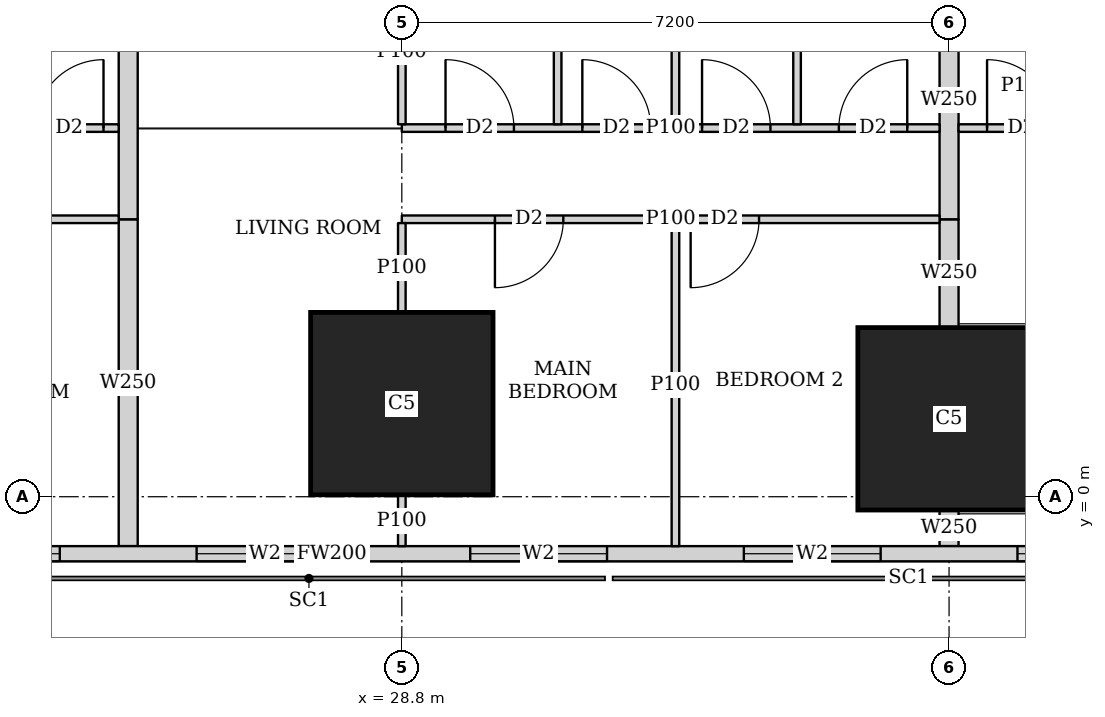
"""IFC4 building model, lengths in metres.
Left out: names, types, materials, properties, quantities, classifications, styles, units other than length and angle.
Written with IfcOpenShell. Run it as: python <this file> out.ifc"""

import sys

from ifc_helpers import new_model, si_unit, direction, frame, frame_2d, origin, origin_2d, place, context, subcontext, project, spatial, rectangle, extrude, element, fill, save


model = new_model("IFC4")
c1 = context("Model", 3, precision=1e-05, world=origin(), true_north=direction((0.0, 1.0)))
c2 = subcontext(c1, "Body", "Model", "MODEL_VIEW")
j1 = project(units=[si_unit("LENGTHUNIT", "METRE"), si_unit("PLANEANGLEUNIT", "RADIAN")], contexts=[c1])
p1 = place(None, origin())
s1 = spatial("IfcSite", under=j1, at=p1, CompositionType="ELEMENT")
p2 = place(p1, origin())
s2 = spatial("IfcBuilding", under=s1, at=p2, CompositionType="ELEMENT")
p3 = place(p2, frame((0.0, 0.0, 204.95)))
s3 = spatial("IfcBuildingStorey", under=s2, at=p3, CompositionType="ELEMENT", Elevation=204.95)
for number, where, z_axis, x_axis in (
    (1, (28.8, 1.225, 0.0), (0.0, 0.0, 1.0), (1.0, 0.0, 0.0)),
    (2, (36.0, 1.025, 0.0), (0.0, 0.0, 1.0), (1.0, 0.0, 0.0)),
):
    element("IfcColumn", number, at=place(p3, frame(where, z_axis=z_axis, x_axis=x_axis)), inside=s3, PredefinedType="COLUMN", context=c2, shape_type="SweptSolid", body=[
        extrude(rectangle(XDim=2.4, YDim=2.4, at=origin_2d()), origin(), (0.0, 0.0, 1.0), 3.75),
    ])
p4 = place(p3, frame((7.363, -0.75, 0.0), z_axis=(0.0, 0.0, 1.0), x_axis=(1.0, 0.0, 0.0)))
e3 = element("IfcWall", 3, at=p4, inside=s3, PredefinedType="SOLIDWALL", context=c2, shape_type="SweptSolid", body=[
    extrude(rectangle(XDim=40.428, YDim=0.2, at=frame_2d((20.214, 0.0))), origin(), (0.0, 0.0, 1.0), 3.5),
])
p5 = place(p4, frame((2.319, 0.0, 0.9)))
e4 = element("IfcOpeningElement", 4, at=p5, cuts=e3, PredefinedType="OPENING", context=c2, shape_type="SweptSolid", body=[
    extrude(rectangle(XDim=2.4, YDim=1.5, at=frame_2d((1.2, 0.75))), frame((0.0, 0.11, 0.0), z_axis=(0.0, -1.0, 0.0), x_axis=(1.0, 0.0, 0.0)), (0.0, 0.0, 1.0), 0.22),
])
p6 = place(p4, frame((7.937, 0.0, 0.9)))
e5 = element("IfcOpeningElement", 5, at=p6, cuts=e3, PredefinedType="OPENING", context=c2, shape_type="SweptSolid", body=[
    extrude(rectangle(XDim=1.8, YDim=1.5, at=frame_2d((0.9, 0.75))), frame((0.0, 0.11, 0.0), z_axis=(0.0, -1.0, 0.0), x_axis=(1.0, 0.0, 0.0)), (0.0, 0.0, 1.0), 0.22),
])
p7 = place(p4, frame((11.537, 0.0, 0.9)))
e6 = element("IfcOpeningElement", 6, at=p7, cuts=e3, PredefinedType="OPENING", context=c2, shape_type="SweptSolid", body=[
    extrude(rectangle(XDim=1.8, YDim=1.5, at=frame_2d((0.9, 0.75))), frame((0.0, 0.11, 0.0), z_axis=(0.0, -1.0, 0.0), x_axis=(1.0, 0.0, 0.0)), (0.0, 0.0, 1.0), 0.22),
])
p8 = place(p4, frame((15.137, 0.0, 0.9)))
e7 = element("IfcOpeningElement", 7, at=p8, cuts=e3, PredefinedType="OPENING", context=c2, shape_type="SweptSolid", body=[
    extrude(rectangle(XDim=1.8, YDim=1.5, at=frame_2d((0.9, 0.75))), frame((0.0, 0.11, 0.0), z_axis=(0.0, -1.0, 0.0), x_axis=(1.0, 0.0, 0.0)), (0.0, 0.0, 1.0), 0.22),
])
p9 = place(p4, frame((18.737, 0.0, 0.9)))
e8 = element("IfcOpeningElement", 8, at=p9, cuts=e3, PredefinedType="OPENING", context=c2, shape_type="SweptSolid", body=[
    extrude(rectangle(XDim=1.8, YDim=1.5, at=frame_2d((0.9, 0.75))), frame((0.0, 0.11, 0.0), z_axis=(0.0, -1.0, 0.0), x_axis=(1.0, 0.0, 0.0)), (0.0, 0.0, 1.0), 0.22),
])
p10 = place(p4, frame((22.337, 0.0, 0.9)))
e9 = element("IfcOpeningElement", 9, at=p10, cuts=e3, PredefinedType="OPENING", context=c2, shape_type="SweptSolid", body=[
    extrude(rectangle(XDim=1.8, YDim=1.5, at=frame_2d((0.9, 0.75))), frame((0.0, 0.11, 0.0), z_axis=(0.0, -1.0, 0.0), x_axis=(1.0, 0.0, 0.0)), (0.0, 0.0, 1.0), 0.22),
])
p11 = place(p4, frame((25.937, 0.0, 0.9)))
e10 = element("IfcOpeningElement", 10, at=p11, cuts=e3, PredefinedType="OPENING", context=c2, shape_type="SweptSolid", body=[
    extrude(rectangle(XDim=1.8, YDim=1.5, at=frame_2d((0.9, 0.75))), frame((0.0, 0.11, 0.0), z_axis=(0.0, -1.0, 0.0), x_axis=(1.0, 0.0, 0.0)), (0.0, 0.0, 1.0), 0.22),
])
p12 = place(p4, frame((29.537, 0.0, 0.9)))
e11 = element("IfcOpeningElement", 11, at=p12, cuts=e3, PredefinedType="OPENING", context=c2, shape_type="SweptSolid", body=[
    extrude(rectangle(XDim=1.8, YDim=1.5, at=frame_2d((0.9, 0.75))), frame((0.0, 0.11, 0.0), z_axis=(0.0, -1.0, 0.0), x_axis=(1.0, 0.0, 0.0)), (0.0, 0.0, 1.0), 0.22),
])
p13 = place(p3, frame((33.68, 42.723, 0.0), z_axis=(0.0, 0.0, 1.0), x_axis=(0.185601160014, -0.982625162207, 0.0)))
e12 = element("IfcWall", 12, at=p13, inside=s3, PredefinedType="SOLIDWALL", context=c2, shape_type="SweptSolid", body=[
    extrude(rectangle(XDim=41.051, YDim=0.15, at=frame_2d((20.526, 0.0))), origin(), (0.0, 0.0, 1.0), 2.5),
])
p14 = place(p13, frame((12.307, 0.0, 0.0)))
e13 = element("IfcOpeningElement", 13, at=p14, cuts=e12, PredefinedType="OPENING", context=c2, shape_type="SweptSolid", body=[
    extrude(rectangle(XDim=1.0, YDim=2.1, at=frame_2d((0.5, 1.05))), frame((0.0, 0.085, 0.0), z_axis=(0.0, -1.0, 0.0), x_axis=(1.0, 0.0, 0.0)), (0.0, 0.0, 1.0), 0.17),
])
p15 = place(p13, frame((16.123, 0.0, 0.0)))
e14 = element("IfcOpeningElement", 14, at=p15, cuts=e12, PredefinedType="OPENING", context=c2, shape_type="SweptSolid", body=[
    extrude(rectangle(XDim=1.0, YDim=2.1, at=frame_2d((0.5, 1.05))), frame((0.0, 0.085, 0.0), z_axis=(0.0, -1.0, 0.0), x_axis=(1.0, 0.0, 0.0)), (0.0, 0.0, 1.0), 0.17),
])
p16 = place(p13, frame((30.902, 0.0, 0.0)))
e15 = element("IfcOpeningElement", 15, at=p16, cuts=e12, PredefinedType="OPENING", context=c2, shape_type="SweptSolid", body=[
    extrude(rectangle(XDim=1.0, YDim=2.1, at=frame_2d((0.5, 1.05))), frame((0.0, 0.085, 0.0), z_axis=(0.0, -1.0, 0.0), x_axis=(1.0, 0.0, 0.0)), (0.0, 0.0, 1.0), 0.17),
])
p17 = place(p3, frame((25.075, 3.65, 0.0), z_axis=(0.0, 0.0, 1.0), x_axis=(-1.0, 0.0, 0.0)))
e16 = element("IfcWall", 16, at=p17, inside=s3, PredefinedType="PARTITIONING", context=c2, shape_type="SweptSolid", body=[
    extrude(rectangle(XDim=3.475, YDim=0.1, at=frame_2d((1.737, 0.0))), origin(), (0.0, 0.0, 1.0), 3.5),
])
p18 = place(p17, frame((2.375, 0.0, 0.0)))
e17 = element("IfcOpeningElement", 17, at=p18, cuts=e16, PredefinedType="OPENING", context=c2, shape_type="SweptSolid", body=[
    extrude(rectangle(XDim=0.9, YDim=2.1, at=frame_2d((0.45, 1.05))), frame((0.0, 0.06, 0.0), z_axis=(0.0, -1.0, 0.0), x_axis=(1.0, 0.0, 0.0)), (0.0, 0.0, 1.0), 0.12),
])
p19 = place(p3, frame((25.075, 4.85, 0.0), z_axis=(0.0, 0.0, 1.0), x_axis=(-1.0, 0.0, 0.0)))
e18 = element("IfcWall", 18, at=p19, inside=s3, PredefinedType="PARTITIONING", context=c2, shape_type="SweptSolid", body=[
    extrude(rectangle(XDim=3.475, YDim=0.1, at=frame_2d((1.737, 0.0))), origin(), (0.0, 0.0, 1.0), 3.5),
])
p20 = place(p19, frame((2.0, 0.0, 0.0)))
e19 = element("IfcOpeningElement", 19, at=p20, cuts=e18, PredefinedType="OPENING", context=c2, shape_type="SweptSolid", body=[
    extrude(rectangle(XDim=0.9, YDim=2.1, at=frame_2d((0.45, 1.05))), frame((0.0, 0.06, 0.0), z_axis=(0.0, -1.0, 0.0), x_axis=(1.0, 0.0, 0.0)), (0.0, 0.0, 1.0), 0.12),
])
p21 = place(p19, frame((0.2, 0.0, 0.0)))
e20 = element("IfcOpeningElement", 20, at=p21, cuts=e18, PredefinedType="OPENING", context=c2, shape_type="SweptSolid", body=[
    extrude(rectangle(XDim=0.9, YDim=2.1, at=frame_2d((0.45, 1.05))), frame((0.0, 0.06, 0.0), z_axis=(0.0, -1.0, 0.0), x_axis=(1.0, 0.0, 0.0)), (0.0, 0.0, 1.0), 0.12),
])
p22 = place(p3, frame((35.875, 3.65, 0.0), z_axis=(0.0, 0.0, 1.0), x_axis=(-1.0, 0.0, 0.0)))
e21 = element("IfcWall", 21, at=p22, inside=s3, PredefinedType="PARTITIONING", context=c2, shape_type="SweptSolid", body=[
    extrude(rectangle(XDim=7.075, YDim=0.1, at=frame_2d((3.538, 0.0))), origin(), (0.0, 0.0, 1.0), 3.5),
])
p23 = place(p22, frame((4.95, 0.0, 0.0)))
e22 = element("IfcOpeningElement", 22, at=p23, cuts=e21, PredefinedType="OPENING", context=c2, shape_type="SweptSolid", body=[
    extrude(rectangle(XDim=0.9, YDim=2.1, at=frame_2d((0.45, 1.05))), frame((0.0, 0.06, 0.0), z_axis=(0.0, -1.0, 0.0), x_axis=(1.0, 0.0, 0.0)), (0.0, 0.0, 1.0), 0.12),
])
p24 = place(p22, frame((2.375, 0.0, 0.0)))
e23 = element("IfcOpeningElement", 23, at=p24, cuts=e21, PredefinedType="OPENING", context=c2, shape_type="SweptSolid", body=[
    extrude(rectangle(XDim=0.9, YDim=2.1, at=frame_2d((0.45, 1.05))), frame((0.0, 0.06, 0.0), z_axis=(0.0, -1.0, 0.0), x_axis=(1.0, 0.0, 0.0)), (0.0, 0.0, 1.0), 0.12),
])
p25 = place(p3, frame((35.875, 4.85, 0.0), z_axis=(0.0, 0.0, 1.0), x_axis=(-1.0, 0.0, 0.0)))
e24 = element("IfcWall", 24, at=p25, inside=s3, PredefinedType="PARTITIONING", context=c2, shape_type="SweptSolid", body=[
    extrude(rectangle(XDim=7.075, YDim=0.1, at=frame_2d((3.538, 0.0))), origin(), (0.0, 0.0, 1.0), 3.5),
])
p26 = place(p25, frame((5.6, 0.0, 0.0)))
e25 = element("IfcOpeningElement", 25, at=p26, cuts=e24, PredefinedType="OPENING", context=c2, shape_type="SweptSolid", body=[
    extrude(rectangle(XDim=0.9, YDim=2.1, at=frame_2d((0.45, 1.05))), frame((0.0, 0.06, 0.0), z_axis=(0.0, -1.0, 0.0), x_axis=(1.0, 0.0, 0.0)), (0.0, 0.0, 1.0), 0.12),
])
p27 = place(p25, frame((2.225, 0.0, 0.0)))
e26 = element("IfcOpeningElement", 26, at=p27, cuts=e24, PredefinedType="OPENING", context=c2, shape_type="SweptSolid", body=[
    extrude(rectangle(XDim=0.9, YDim=2.1, at=frame_2d((0.45, 1.05))), frame((0.0, 0.06, 0.0), z_axis=(0.0, -1.0, 0.0), x_axis=(1.0, 0.0, 0.0)), (0.0, 0.0, 1.0), 0.12),
])
p28 = place(p25, frame((3.8, 0.0, 0.0)))
e27 = element("IfcOpeningElement", 27, at=p28, cuts=e24, PredefinedType="OPENING", context=c2, shape_type="SweptSolid", body=[
    extrude(rectangle(XDim=0.9, YDim=2.1, at=frame_2d((0.45, 1.05))), frame((0.0, 0.06, 0.0), z_axis=(0.0, -1.0, 0.0), x_axis=(1.0, 0.0, 0.0)), (0.0, 0.0, 1.0), 0.12),
])
p29 = place(p25, frame((0.425, 0.0, 0.0)))
e28 = element("IfcOpeningElement", 28, at=p29, cuts=e24, PredefinedType="OPENING", context=c2, shape_type="SweptSolid", body=[
    extrude(rectangle(XDim=0.9, YDim=2.1, at=frame_2d((0.45, 1.05))), frame((0.0, 0.06, 0.0), z_axis=(0.0, -1.0, 0.0), x_axis=(1.0, 0.0, 0.0)), (0.0, 0.0, 1.0), 0.12),
])
p30 = place(p3, frame((28.8, -0.65, 0.0), z_axis=(0.0, 0.0, 1.0), x_axis=(0.0, 1.0, 0.0)))
e29 = element("IfcWall", 29, at=p30, inside=s3, PredefinedType="PARTITIONING", context=c2, shape_type="SweptSolid", body=[
    extrude(rectangle(XDim=0.674, YDim=0.1, at=frame_2d((0.337, 0.0))), origin(), (0.0, 0.0, 1.0), 3.5),
])
p31 = place(p3, frame((28.8, 2.426, 0.0), z_axis=(0.0, 0.0, 1.0), x_axis=(0.0, 1.0, 0.0)))
e30 = element("IfcWall", 30, at=p31, inside=s3, PredefinedType="PARTITIONING", context=c2, shape_type="SweptSolid", body=[
    extrude(rectangle(XDim=1.174, YDim=0.1, at=frame_2d((0.587, 0.0))), origin(), (0.0, 0.0, 1.0), 3.5),
])
p32 = place(p3, frame((32.4, -0.65, 0.0), z_axis=(0.0, 0.0, 1.0), x_axis=(0.0, 1.0, 0.0)))
e31 = element("IfcWall", 31, at=p32, inside=s3, PredefinedType="PARTITIONING", context=c2, shape_type="SweptSolid", body=[
    extrude(rectangle(XDim=4.25, YDim=0.1, at=frame_2d((2.125, 0.0))), origin(), (0.0, 0.0, 1.0), 2.05),
])
p33 = place(p3, frame((28.8, 4.9, 0.0), z_axis=(0.0, 0.0, 1.0), x_axis=(0.0, 1.0, 0.0)))
e32 = element("IfcWall", 32, at=p33, inside=s3, PredefinedType="PARTITIONING", context=c2, shape_type="SweptSolid", body=[
    extrude(rectangle(XDim=1.899, YDim=0.1, at=frame_2d((0.95, 0.0))), origin(), (0.0, 0.0, 1.0), 3.5),
])
for number, where, z_axis, x_axis in (
    (33, (32.4, 4.9, 0.0), (0.0, 0.0, 1.0), (0.0, 1.0, 0.0)),
    (34, (30.85, 4.9, 0.0), (0.0, 0.0, 1.0), (0.0, 1.0, 0.0)),
    (35, (34.0, 4.9, 0.0), (0.0, 0.0, 1.0), (0.0, 1.0, 0.0)),
):
    element("IfcWall", number, at=place(p3, frame(where, z_axis=z_axis, x_axis=x_axis)), inside=s3, PredefinedType="PARTITIONING", context=c2, shape_type="SweptSolid", body=[
        extrude(rectangle(XDim=3.525, YDim=0.1, at=frame_2d((1.763, 0.0))), origin(), (0.0, 0.0, 1.0), 3.5),
    ])
p34 = place(p3, frame((25.2, -0.65, 0.0), z_axis=(0.0, 0.0, 1.0), x_axis=(0.0, 1.0, 0.0)))
e36 = element("IfcWall", 36, at=p34, inside=s3, PredefinedType="SOLIDWALL", context=c2, shape_type="SweptSolid", body=[
    extrude(rectangle(XDim=4.3, YDim=0.25, at=frame_2d((2.15, 0.0))), origin(), (0.0, 0.0, 1.0), 2.05),
])
p35 = place(p3, frame((25.2, 3.65, 0.0), z_axis=(0.0, 0.0, 1.0), x_axis=(0.0, 1.0, 0.0)))
e37 = element("IfcWall", 37, at=p35, inside=s3, PredefinedType="SOLIDWALL", context=c2, shape_type="SweptSolid", body=[
    extrude(rectangle(XDim=4.775, YDim=0.25, at=frame_2d((2.388, 0.0))), origin(), (0.0, 0.0, 1.0), 3.5),
])
p36 = place(p3, frame((37.89, 4.85, 0.0), z_axis=(0.0, 0.0, 1.0), x_axis=(-1.0, 0.0, 0.0)))
e38 = element("IfcWall", 38, at=p36, inside=s3, PredefinedType="PARTITIONING", context=c2, shape_type="SweptSolid", body=[
    extrude(rectangle(XDim=1.765, YDim=0.1, at=frame_2d((0.882, 0.0))), origin(), (0.0, 0.0, 1.0), 3.5),
])
p37 = place(p36, frame((0.49, 0.0, 0.0)))
e39 = element("IfcOpeningElement", 39, at=p37, cuts=e38, PredefinedType="OPENING", context=c2, shape_type="SweptSolid", body=[
    extrude(rectangle(XDim=0.9, YDim=2.1, at=frame_2d((0.45, 1.05))), frame((0.0, 0.06, 0.0), z_axis=(0.0, -1.0, 0.0), x_axis=(1.0, 0.0, 0.0)), (0.0, 0.0, 1.0), 0.12),
])
p38 = place(p3, frame((36.0, -0.65, 0.0), z_axis=(0.0, 0.0, 1.0), x_axis=(0.0, 1.0, 0.0)))
e40 = element("IfcWall", 40, at=p38, inside=s3, PredefinedType="SOLIDWALL", context=c2, shape_type="SweptSolid", body=[
    extrude(rectangle(XDim=0.474, YDim=0.25, at=frame_2d((0.237, 0.0))), origin(), (0.0, 0.0, 1.0), 2.05),
])
p39 = place(p3, frame((36.0, 2.226, 0.0), z_axis=(0.0, 0.0, 1.0), x_axis=(0.0, 1.0, 0.0)))
e41 = element("IfcWall", 41, at=p39, inside=s3, PredefinedType="SOLIDWALL", context=c2, shape_type="SweptSolid", body=[
    extrude(rectangle(XDim=1.424, YDim=0.25, at=frame_2d((0.712, 0.0))), origin(), (0.0, 0.0, 1.0), 2.05),
])
p40 = place(p3, frame((36.0, 3.65, 0.0), z_axis=(0.0, 0.0, 1.0), x_axis=(0.0, 1.0, 0.0)))
e42 = element("IfcWall", 42, at=p40, inside=s3, PredefinedType="SOLIDWALL", context=c2, shape_type="SweptSolid", body=[
    extrude(rectangle(XDim=3.149, YDim=0.25, at=frame_2d((1.575, 0.0))), origin(), (0.0, 0.0, 1.0), 3.5),
])
p41 = place(p8, origin())
e43 = element("IfcWindow", 43, at=p41, inside=s3, PartitioningType="SINGLE_PANEL", PredefinedType="WINDOW", context=c2, shape_type="SweptSolid", body=[
    extrude(rectangle(XDim=1.8, YDim=1.5, at=frame_2d((0.9, 0.75))), frame((0.0, 0.03, 0.0), z_axis=(0.0, -1.0, 0.0), x_axis=(1.0, 0.0, 0.0)), (0.0, 0.0, 1.0), 0.06),
])
fill(e7, e43)
p42 = place(p9, origin())
e44 = element("IfcWindow", 44, at=p42, inside=s3, PartitioningType="SINGLE_PANEL", PredefinedType="WINDOW", context=c2, shape_type="SweptSolid", body=[
    extrude(rectangle(XDim=1.8, YDim=1.5, at=frame_2d((0.9, 0.75))), frame((0.0, 0.03, 0.0), z_axis=(0.0, -1.0, 0.0), x_axis=(1.0, 0.0, 0.0)), (0.0, 0.0, 1.0), 0.06),
])
fill(e8, e44)
p43 = place(p10, origin())
e45 = element("IfcWindow", 45, at=p43, inside=s3, PartitioningType="SINGLE_PANEL", PredefinedType="WINDOW", context=c2, shape_type="SweptSolid", body=[
    extrude(rectangle(XDim=1.8, YDim=1.5, at=frame_2d((0.9, 0.75))), frame((0.0, 0.03, 0.0), z_axis=(0.0, -1.0, 0.0), x_axis=(1.0, 0.0, 0.0)), (0.0, 0.0, 1.0), 0.06),
])
fill(e9, e45)
p44 = place(p11, origin())
e46 = element("IfcWindow", 46, at=p44, inside=s3, PartitioningType="SINGLE_PANEL", PredefinedType="WINDOW", context=c2, shape_type="SweptSolid", body=[
    extrude(rectangle(XDim=1.8, YDim=1.5, at=frame_2d((0.9, 0.75))), frame((0.0, 0.03, 0.0), z_axis=(0.0, -1.0, 0.0), x_axis=(1.0, 0.0, 0.0)), (0.0, 0.0, 1.0), 0.06),
])
fill(e10, e46)
p45 = place(p12, origin())
e47 = element("IfcWindow", 47, at=p45, inside=s3, PartitioningType="SINGLE_PANEL", PredefinedType="WINDOW", context=c2, shape_type="SweptSolid", body=[
    extrude(rectangle(XDim=1.8, YDim=1.5, at=frame_2d((0.9, 0.75))), frame((0.0, 0.03, 0.0), z_axis=(0.0, -1.0, 0.0), x_axis=(1.0, 0.0, 0.0)), (0.0, 0.0, 1.0), 0.06),
])
fill(e11, e47)
p46 = place(p21, origin())
e48 = element("IfcDoor", 48, at=p46, inside=s3, OperationType="SINGLE_SWING_RIGHT", PredefinedType="DOOR", context=c2, shape_type="SweptSolid", body=[
    extrude(rectangle(XDim=0.9, YDim=2.1, at=frame_2d((0.45, 1.05))), frame((0.0, 0.025, 0.0), z_axis=(0.0, -1.0, 0.0), x_axis=(1.0, 0.0, 0.0)), (0.0, 0.0, 1.0), 0.05),
])
fill(e20, e48)
p47 = place(p23, origin())
e49 = element("IfcDoor", 49, at=p47, inside=s3, OperationType="SINGLE_SWING_RIGHT", PredefinedType="DOOR", context=c2, shape_type="SweptSolid", body=[
    extrude(rectangle(XDim=0.9, YDim=2.1, at=frame_2d((0.45, 1.05))), frame((0.0, 0.025, 0.0), z_axis=(0.0, -1.0, 0.0), x_axis=(1.0, 0.0, 0.0)), (0.0, 0.0, 1.0), 0.05),
])
fill(e22, e49)
p48 = place(p24, origin())
e50 = element("IfcDoor", 50, at=p48, inside=s3, OperationType="SINGLE_SWING_RIGHT", PredefinedType="DOOR", context=c2, shape_type="SweptSolid", body=[
    extrude(rectangle(XDim=0.9, YDim=2.1, at=frame_2d((0.45, 1.05))), frame((0.0, 0.025, 0.0), z_axis=(0.0, -1.0, 0.0), x_axis=(1.0, 0.0, 0.0)), (0.0, 0.0, 1.0), 0.05),
])
fill(e23, e50)
p49 = place(p26, origin())
e51 = element("IfcDoor", 51, at=p49, inside=s3, OperationType="SINGLE_SWING_LEFT", PredefinedType="DOOR", context=c2, shape_type="SweptSolid", body=[
    extrude(rectangle(XDim=0.9, YDim=2.1, at=frame_2d((0.45, 1.05))), frame((0.0, 0.025, 0.0), z_axis=(0.0, -1.0, 0.0), x_axis=(1.0, 0.0, 0.0)), (0.0, 0.0, 1.0), 0.05),
])
fill(e25, e51)
p50 = place(p27, origin())
e52 = element("IfcDoor", 52, at=p50, inside=s3, OperationType="SINGLE_SWING_LEFT", PredefinedType="DOOR", context=c2, shape_type="SweptSolid", body=[
    extrude(rectangle(XDim=0.9, YDim=2.1, at=frame_2d((0.45, 1.05))), frame((0.0, 0.025, 0.0), z_axis=(0.0, -1.0, 0.0), x_axis=(1.0, 0.0, 0.0)), (0.0, 0.0, 1.0), 0.05),
])
fill(e26, e52)
p51 = place(p28, origin())
e53 = element("IfcDoor", 53, at=p51, inside=s3, OperationType="SINGLE_SWING_LEFT", PredefinedType="DOOR", context=c2, shape_type="SweptSolid", body=[
    extrude(rectangle(XDim=0.9, YDim=2.1, at=frame_2d((0.45, 1.05))), frame((0.0, 0.025, 0.0), z_axis=(0.0, -1.0, 0.0), x_axis=(1.0, 0.0, 0.0)), (0.0, 0.0, 1.0), 0.05),
])
fill(e27, e53)
p52 = place(p29, origin())
e54 = element("IfcDoor", 54, at=p52, inside=s3, OperationType="SINGLE_SWING_RIGHT", PredefinedType="DOOR", context=c2, shape_type="SweptSolid", body=[
    extrude(rectangle(XDim=0.9, YDim=2.1, at=frame_2d((0.45, 1.05))), frame((0.0, 0.025, 0.0), z_axis=(0.0, -1.0, 0.0), x_axis=(1.0, 0.0, 0.0)), (0.0, 0.0, 1.0), 0.05),
])
fill(e28, e54)
p53 = place(p37, origin())
e55 = element("IfcDoor", 55, at=p53, inside=s3, OperationType="SINGLE_SWING_LEFT", PredefinedType="DOOR", context=c2, shape_type="SweptSolid", body=[
    extrude(rectangle(XDim=0.9, YDim=2.1, at=frame_2d((0.45, 1.05))), frame((0.0, 0.025, 0.0), z_axis=(0.0, -1.0, 0.0), x_axis=(1.0, 0.0, 0.0)), (0.0, 0.0, 1.0), 0.05),
])
fill(e39, e55)
save(model, sys.argv[1])
